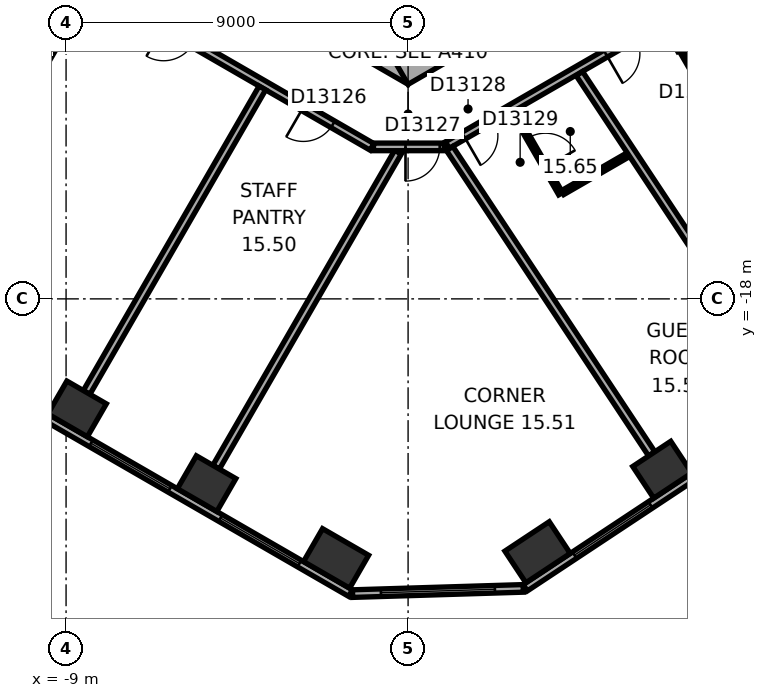
"""IFC4 building model, lengths in metres.
Left out: names, types, materials, properties, quantities, classifications, styles, units other than length and angle.
Written with IfcOpenShell. Run it as: python <this file> out.ifc"""

import sys

from ifc_helpers import new_model, si_unit, direction, frame, frame_2d, origin, origin_2d, place, context, subcontext, project, spatial, rectangle, extrude, element, fill, save


model = new_model("IFC4")
c1 = context("Model", 3, precision=1e-05, world=origin(), true_north=direction((0.0, 1.0)))
c2 = subcontext(c1, "Body", "Model", "MODEL_VIEW")
j1 = project(units=[si_unit("LENGTHUNIT", "METRE"), si_unit("PLANEANGLEUNIT", "RADIAN")], contexts=[c1])
p1 = place(None, origin())
s1 = spatial("IfcSite", under=j1, at=p1, CompositionType="ELEMENT")
p2 = place(p1, origin())
s2 = spatial("IfcBuilding", under=s1, at=p2, CompositionType="ELEMENT")
p3 = place(p2, frame((0.0, 0.0, 70.4)))
s3 = spatial("IfcBuildingStorey", under=s2, at=p3, CompositionType="ELEMENT", Elevation=70.4)
for number, where, z_axis, x_axis in (
    (1, (-8.71, -20.895, 0.0), (0.0, 0.0, 1.0), (0.866, -0.5, 0.0)),
    (2, (-5.302, -22.862, 0.0), (0.0, 0.0, 1.0), (0.866, -0.5, 0.0)),
):
    element("IfcColumn", number, at=place(p3, frame(where, z_axis=z_axis, x_axis=x_axis)), inside=s3, PredefinedType="COLUMN", context=c2, shape_type="SweptSolid", body=[
        extrude(rectangle(XDim=1.2, YDim=1.0, at=origin_2d()), origin(), (0.0, 0.0, 1.0), 3.3),
    ])
for number, where, z_axis, x_axis in (
    (3, (-1.895, -24.829, 0.0), (0.0, 0.0, 1.0), (0.866, -0.5, 0.0)),
    (4, (3.407, -24.667, 0.0), (0.0, 0.0, 1.0), (0.834, 0.552, 0.0)),
):
    element("IfcColumn", number, at=place(p3, frame(where, z_axis=z_axis, x_axis=x_axis)), inside=s3, PredefinedType="COLUMN", context=c2, shape_type="SweptSolid", body=[
        extrude(rectangle(XDim=1.4, YDim=1.0, at=origin_2d()), origin(), (0.0, 0.0, 1.0), 3.3),
    ])
p4 = place(p3, frame((6.688, -22.496, 0.0), z_axis=(0.0, 0.0, 1.0), x_axis=(0.833885822067, 0.551936985312, 0.0)))
e5 = element("IfcColumn", 5, at=p4, inside=s3, PredefinedType="COLUMN", context=c2, shape_type="SweptSolid", body=[
    extrude(rectangle(XDim=1.2, YDim=1.0, at=origin_2d()), origin(), (0.0, 0.0, 1.0), 3.3),
])
p5 = place(p3, frame((-10.4, -5.658, 0.0), z_axis=(0.0, 0.0, 1.0), x_axis=(0.866021384402, -0.500006961711, 0.0)))
e6 = element("IfcWall", 6, at=p5, inside=s3, PredefinedType="SHEAR", context=c2, shape_type="SweptSolid", body=[
    extrude(rectangle(XDim=12.355, YDim=1.2, at=frame_2d((6.178, 0.0))), origin(), (0.0, 0.0, 1.0), 3.3),
])
p6 = place(p5, frame((6.378, 0.0, 0.0)))
e7 = element("IfcOpeningElement", 7, at=p6, cuts=e6, PredefinedType="OPENING", context=c2, shape_type="SweptSolid", body=[
    extrude(rectangle(XDim=1.5, YDim=2.1, at=frame_2d((0.75, 1.05))), frame((0.0, 0.61, 0.0), z_axis=(0.0, -1.0, 0.0), x_axis=(1.0, 0.0, 0.0)), (0.0, 0.0, 1.0), 1.22),
])
p7 = place(p5, frame((3.228, 0.0, 0.0)))
e8 = element("IfcOpeningElement", 8, at=p7, cuts=e6, PredefinedType="OPENING", context=c2, shape_type="SweptSolid", body=[
    extrude(rectangle(XDim=0.9, YDim=2.1, at=frame_2d((0.45, 1.05))), frame((0.0, 0.61, 0.0), z_axis=(0.0, -1.0, 0.0), x_axis=(1.0, 0.0, 0.0)), (0.0, 0.0, 1.0), 1.22),
])
p8 = place(p3, frame((-0.3, -11.836, 0.0), z_axis=(0.0, 0.0, 1.0), x_axis=(0.866021384402, 0.500006961711, 0.0)))
e9 = element("IfcWall", 9, at=p8, inside=s3, PredefinedType="SHEAR", context=c2, shape_type="SweptSolid", body=[
    extrude(rectangle(XDim=12.355, YDim=1.2, at=frame_2d((6.178, 0.0))), origin(), (0.0, 0.0, 1.0), 3.3),
])
p9 = place(p8, frame((4.128, 0.0, 0.0)))
e10 = element("IfcOpeningElement", 10, at=p9, cuts=e9, PredefinedType="OPENING", context=c2, shape_type="SweptSolid", body=[
    extrude(rectangle(XDim=0.9, YDim=2.1, at=frame_2d((0.45, 1.05))), frame((0.0, 0.61, 0.0), z_axis=(0.0, -1.0, 0.0), x_axis=(1.0, 0.0, 0.0)), (0.0, 0.0, 1.0), 1.22),
])
p10 = place(p8, frame((7.928, 0.0, 0.0)))
e11 = element("IfcOpeningElement", 11, at=p10, cuts=e9, PredefinedType="OPENING", context=c2, shape_type="SweptSolid", body=[
    extrude(rectangle(XDim=1.1, YDim=2.1, at=frame_2d((0.55, 1.05))), frame((0.0, 0.61, 0.0), z_axis=(0.0, -1.0, 0.0), x_axis=(1.0, 0.0, 0.0)), (0.0, 0.0, 1.0), 1.22),
])
p11 = place(p3, frame((-19.914, -15.119, 0.0), z_axis=(0.0, 0.0, 1.0), x_axis=(0.866025418898, -0.499999973822, 0.0)))
e12 = element("IfcWall", 12, at=p11, inside=s3, PredefinedType="STANDARD", context=c2, shape_type="SweptSolid", body=[
    extrude(rectangle(XDim=21.246, YDim=0.2, at=frame_2d((10.623, 0.0))), origin(), (0.0, 0.0, 1.0), 3.3),
])
p12 = place(p11, frame((1.555, 0.0, 0.8)))
e13 = element("IfcOpeningElement", 13, at=p12, cuts=e12, PredefinedType="OPENING", context=c2, shape_type="SweptSolid", body=[
    extrude(rectangle(XDim=2.4, YDim=1.7, at=frame_2d((1.2, 0.85))), frame((0.0, 0.11, 0.0), z_axis=(0.0, -1.0, 0.0), x_axis=(1.0, 0.0, 0.0)), (0.0, 0.0, 1.0), 0.22),
])
p13 = place(p11, frame((5.489, 0.0, 0.8)))
e14 = element("IfcOpeningElement", 14, at=p13, cuts=e12, PredefinedType="OPENING", context=c2, shape_type="SweptSolid", body=[
    extrude(rectangle(XDim=2.4, YDim=1.7, at=frame_2d((1.2, 0.85))), frame((0.0, 0.11, 0.0), z_axis=(0.0, -1.0, 0.0), x_axis=(1.0, 0.0, 0.0)), (0.0, 0.0, 1.0), 0.22),
])
p14 = place(p11, frame((9.424, 0.0, 0.8)))
e15 = element("IfcOpeningElement", 15, at=p14, cuts=e12, PredefinedType="OPENING", context=c2, shape_type="SweptSolid", body=[
    extrude(rectangle(XDim=2.4, YDim=1.7, at=frame_2d((1.2, 0.85))), frame((0.0, 0.11, 0.0), z_axis=(0.0, -1.0, 0.0), x_axis=(1.0, 0.0, 0.0)), (0.0, 0.0, 1.0), 0.22),
])
p15 = place(p11, frame((13.358, 0.0, 0.8)))
e16 = element("IfcOpeningElement", 16, at=p15, cuts=e12, PredefinedType="OPENING", context=c2, shape_type="SweptSolid", body=[
    extrude(rectangle(XDim=2.4, YDim=1.7, at=frame_2d((1.2, 0.85))), frame((0.0, 0.11, 0.0), z_axis=(0.0, -1.0, 0.0), x_axis=(1.0, 0.0, 0.0)), (0.0, 0.0, 1.0), 0.22),
])
p16 = place(p11, frame((17.293, 0.0, 0.8)))
e17 = element("IfcOpeningElement", 17, at=p16, cuts=e12, PredefinedType="OPENING", context=c2, shape_type="SweptSolid", body=[
    extrude(rectangle(XDim=2.4, YDim=1.7, at=frame_2d((1.2, 0.85))), frame((0.0, 0.11, 0.0), z_axis=(0.0, -1.0, 0.0), x_axis=(1.0, 0.0, 0.0)), (0.0, 0.0, 1.0), 0.22),
])
p17 = place(p3, frame((-1.461, -25.755, 0.0), z_axis=(0.0, 0.0, 1.0), x_axis=(0.999533823446, 0.030530898895, 0.0)))
e18 = element("IfcWall", 18, at=p17, inside=s3, PredefinedType="STANDARD", context=c2, shape_type="SweptSolid", body=[
    extrude(rectangle(XDim=4.494, YDim=0.2, at=frame_2d((2.247, 0.0))), origin(), (0.0, 0.0, 1.0), 3.3),
])
p18 = place(p17, frame((0.747, 0.0, 0.8)))
e19 = element("IfcOpeningElement", 19, at=p18, cuts=e18, PredefinedType="OPENING", context=c2, shape_type="SweptSolid", body=[
    extrude(rectangle(XDim=3.0, YDim=1.7, at=frame_2d((1.5, 0.85))), frame((0.0, 0.11, 0.0), z_axis=(0.0, -1.0, 0.0), x_axis=(1.0, 0.0, 0.0)), (0.0, 0.0, 1.0), 0.22),
])
p19 = place(p3, frame((3.083, -25.601, 0.0), z_axis=(0.0, 0.0, 1.0), x_axis=(0.833884295743, 0.551939291329, 0.0)))
e20 = element("IfcWall", 20, at=p19, inside=s3, PredefinedType="STANDARD", context=c2, shape_type="SweptSolid", body=[
    extrude(rectangle(XDim=21.246, YDim=0.2, at=frame_2d((10.623, 0.0))), origin(), (0.0, 0.0, 1.0), 3.3),
])
p20 = place(p19, frame((1.553, 0.0, 0.8)))
e21 = element("IfcOpeningElement", 21, at=p20, cuts=e20, PredefinedType="OPENING", context=c2, shape_type="SweptSolid", body=[
    extrude(rectangle(XDim=2.4, YDim=1.7, at=frame_2d((1.2, 0.85))), frame((0.0, 0.11, 0.0), z_axis=(0.0, -1.0, 0.0), x_axis=(1.0, 0.0, 0.0)), (0.0, 0.0, 1.0), 0.22),
])
p21 = place(p19, frame((5.488, 0.0, 0.8)))
e22 = element("IfcOpeningElement", 22, at=p21, cuts=e20, PredefinedType="OPENING", context=c2, shape_type="SweptSolid", body=[
    extrude(rectangle(XDim=2.4, YDim=1.7, at=frame_2d((1.2, 0.85))), frame((0.0, 0.11, 0.0), z_axis=(0.0, -1.0, 0.0), x_axis=(1.0, 0.0, 0.0)), (0.0, 0.0, 1.0), 0.22),
])
p22 = place(p19, frame((9.422, 0.0, 0.8)))
e23 = element("IfcOpeningElement", 23, at=p22, cuts=e20, PredefinedType="OPENING", context=c2, shape_type="SweptSolid", body=[
    extrude(rectangle(XDim=2.4, YDim=1.7, at=frame_2d((1.2, 0.85))), frame((0.0, 0.11, 0.0), z_axis=(0.0, -1.0, 0.0), x_axis=(1.0, 0.0, 0.0)), (0.0, 0.0, 1.0), 0.22),
])
p23 = place(p19, frame((13.357, 0.0, 0.8)))
e24 = element("IfcOpeningElement", 24, at=p23, cuts=e20, PredefinedType="OPENING", context=c2, shape_type="SweptSolid", body=[
    extrude(rectangle(XDim=2.4, YDim=1.7, at=frame_2d((1.2, 0.85))), frame((0.0, 0.11, 0.0), z_axis=(0.0, -1.0, 0.0), x_axis=(1.0, 0.0, 0.0)), (0.0, 0.0, 1.0), 0.22),
])
p24 = place(p19, frame((17.291, 0.0, 0.8)))
e25 = element("IfcOpeningElement", 25, at=p24, cuts=e20, PredefinedType="OPENING", context=c2, shape_type="SweptSolid", body=[
    extrude(rectangle(XDim=2.4, YDim=1.7, at=frame_2d((1.2, 0.85))), frame((0.0, 0.11, 0.0), z_axis=(0.0, -1.0, 0.0), x_axis=(1.0, 0.0, 0.0)), (0.0, 0.0, 1.0), 0.22),
])
p25 = place(p3, frame((-11.615, -7.843, 0.0), z_axis=(0.0, 0.0, 1.0), x_axis=(0.866026466995, -0.499998158461, 0.0)))
e26 = element("IfcWall", 26, at=p25, inside=s3, PredefinedType="PARTITIONING", context=c2, shape_type="SweptSolid", body=[
    extrude(rectangle(XDim=12.315, YDim=0.2, at=frame_2d((6.158, 0.0))), origin(), (0.0, 0.0, 1.0), 3.05),
])
p26 = place(p25, frame((5.983, 0.0, 0.0)))
e27 = element("IfcOpeningElement", 27, at=p26, cuts=e26, PredefinedType="OPENING", context=c2, shape_type="SweptSolid", body=[
    extrude(rectangle(XDim=0.9, YDim=2.1, at=frame_2d((0.45, 1.05))), frame((0.0, 0.11, 0.0), z_axis=(0.0, -1.0, 0.0), x_axis=(1.0, 0.0, 0.0)), (0.0, 0.0, 1.0), 0.22),
])
p27 = place(p25, frame((10.229, 0.0, 0.0)))
e28 = element("IfcOpeningElement", 28, at=p27, cuts=e26, PredefinedType="OPENING", context=c2, shape_type="SweptSolid", body=[
    extrude(rectangle(XDim=0.9, YDim=2.1, at=frame_2d((0.45, 1.05))), frame((0.0, 0.11, 0.0), z_axis=(0.0, -1.0, 0.0), x_axis=(1.0, 0.0, 0.0)), (0.0, 0.0, 1.0), 0.22),
])
p28 = place(p3, frame((-8.46, -20.461, 0.0), z_axis=(0.0, 0.0, 1.0), x_axis=(0.499999662836, 0.866025598446, 0.0)))
e29 = element("IfcWall", 29, at=p28, inside=s3, PredefinedType="PARTITIONING", context=c2, shape_type="SweptSolid", body=[
    extrude(rectangle(XDim=9.25, YDim=0.2, at=frame_2d((4.625, 0.0))), origin(), (0.0, 0.0, 1.0), 3.05),
])
p29 = place(p3, frame((-8.398, -9.816, 0.0), z_axis=(0.0, 0.0, 1.0), x_axis=(-0.500007957085, -0.86602080971, 0.0)))
e30 = element("IfcWall", 30, at=p29, inside=s3, PredefinedType="PARTITIONING", context=c2, shape_type="SweptSolid", body=[
    extrude(rectangle(XDim=2.64, YDim=0.12, at=frame_2d((1.32, 0.0))), origin(), (0.0, 0.0, 1.0), 3.05),
])
p30 = place(p29, frame((0.87, 0.0, 0.0)))
e31 = element("IfcOpeningElement", 31, at=p30, cuts=e30, PredefinedType="OPENING", context=c2, shape_type="SweptSolid", body=[
    extrude(rectangle(XDim=0.9, YDim=2.1, at=frame_2d((0.45, 1.05))), frame((0.0, 0.07, 0.0), z_axis=(0.0, -1.0, 0.0), x_axis=(1.0, 0.0, 0.0)), (0.0, 0.0, 1.0), 0.14),
])
p31 = place(p3, frame((-5.052, -22.429, 0.0), z_axis=(0.0, 0.0, 1.0), x_axis=(0.500004329283, 0.866022904257, 0.0)))
e32 = element("IfcWall", 32, at=p31, inside=s3, PredefinedType="PARTITIONING", context=c2, shape_type="SweptSolid", body=[
    extrude(rectangle(XDim=9.572, YDim=0.2, at=frame_2d((4.786, 0.0))), origin(), (0.0, 0.0, 1.0), 3.05),
])
p32 = place(p3, frame((-0.91, -14.001, 0.0), z_axis=(0.0, 0.0, 1.0), x_axis=(1.0, 0.0, 0.0)))
e33 = element("IfcWall", 33, at=p32, inside=s3, PredefinedType="PARTITIONING", context=c2, shape_type="SweptSolid", body=[
    extrude(rectangle(XDim=1.86, YDim=0.2, at=frame_2d((0.93, 0.0))), origin(), (0.0, 0.0, 1.0), 3.05),
])
p33 = place(p32, frame((0.842, 0.0, 0.0)))
e34 = element("IfcOpeningElement", 34, at=p33, cuts=e33, PredefinedType="OPENING", context=c2, shape_type="SweptSolid", body=[
    extrude(rectangle(XDim=0.9, YDim=2.1, at=frame_2d((0.45, 1.05))), frame((0.0, 0.11, 0.0), z_axis=(0.0, -1.0, 0.0), x_axis=(1.0, 0.0, 0.0)), (0.0, 0.0, 1.0), 0.22),
])
p34 = place(p3, frame((1.033, -13.953, 0.0), z_axis=(0.0, 0.0, 1.0), x_axis=(0.866017531406, 0.500013635111, 0.0)))
e35 = element("IfcWall", 35, at=p34, inside=s3, PredefinedType="PARTITIONING", context=c2, shape_type="SweptSolid", body=[
    extrude(rectangle(XDim=6.58, YDim=0.2, at=frame_2d((3.29, 0.0))), origin(), (0.0, 0.0, 1.0), 3.05),
])
p35 = place(p34, frame((0.496, 0.0, 0.0)))
e36 = element("IfcOpeningElement", 36, at=p35, cuts=e35, PredefinedType="OPENING", context=c2, shape_type="SweptSolid", body=[
    extrude(rectangle(XDim=0.9, YDim=2.1, at=frame_2d((0.45, 1.05))), frame((0.0, 0.11, 0.0), z_axis=(0.0, -1.0, 0.0), x_axis=(1.0, 0.0, 0.0)), (0.0, 0.0, 1.0), 0.22),
])
p36 = place(p34, frame((4.811, 0.0, 0.0)))
e37 = element("IfcOpeningElement", 37, at=p36, cuts=e35, PredefinedType="OPENING", context=c2, shape_type="SweptSolid", body=[
    extrude(rectangle(XDim=0.9, YDim=2.1, at=frame_2d((0.45, 1.05))), frame((0.0, 0.11, 0.0), z_axis=(0.0, -1.0, 0.0), x_axis=(1.0, 0.0, 0.0)), (0.0, 0.0, 1.0), 0.22),
])
p37 = place(p3, frame((4.015, -15.233, 0.0), z_axis=(0.0, 0.0, 1.0), x_axis=(-0.499961950354, 0.866047370643, 0.0)))
e38 = element("IfcWall", 38, at=p37, inside=s3, PredefinedType="PARTITIONING", context=c2, shape_type="SweptSolid", body=[
    extrude(rectangle(XDim=2.5, YDim=0.12, at=frame_2d((1.25, 0.0))), origin(), (0.0, 0.0, 1.0), 3.05),
])
p38 = place(p37, frame((0.8, 0.0, 0.0)))
e39 = element("IfcOpeningElement", 39, at=p38, cuts=e38, PredefinedType="OPENING", context=c2, shape_type="SweptSolid", body=[
    extrude(rectangle(XDim=0.9, YDim=2.1, at=frame_2d((0.45, 1.05))), frame((0.0, 0.07, 0.0), z_axis=(0.0, -1.0, 0.0), x_axis=(1.0, 0.0, 0.0)), (0.0, 0.0, 1.0), 0.14),
])
p39 = place(p3, frame((5.798, -14.204, 0.0), z_axis=(0.0, 0.0, 1.0), x_axis=(-0.865972029493, -0.500092435591, 0.0)))
e40 = element("IfcWall", 40, at=p39, inside=s3, PredefinedType="PARTITIONING", context=c2, shape_type="SweptSolid", body=[
    extrude(rectangle(XDim=1.999, YDim=0.12, at=frame_2d((1.0, 0.0))), origin(), (0.0, 0.0, 1.0), 3.05),
])
p40 = place(p3, frame((6.412, -22.079, 0.0), z_axis=(0.0, 0.0, 1.0), x_axis=(-0.551919507115, 0.83389739037, 0.0)))
e41 = element("IfcWall", 41, at=p40, inside=s3, PredefinedType="PARTITIONING", context=c2, shape_type="SweptSolid", body=[
    extrude(rectangle(XDim=9.635, YDim=0.2, at=frame_2d((4.817, 0.0))), origin(), (0.0, 0.0, 1.0), 3.05),
])
p41 = place(p3, frame((8.833, -14.301, 0.0), z_axis=(0.0, 0.0, 1.0), x_axis=(-0.499936836718, 0.866061868051, 0.0)))
e42 = element("IfcWall", 42, at=p41, inside=s3, PredefinedType="PARTITIONING", context=c2, shape_type="SweptSolid", body=[
    extrude(rectangle(XDim=3.188, YDim=0.12, at=frame_2d((1.594, 0.0))), origin(), (0.0, 0.0, 1.0), 3.05),
])
p42 = place(p41, frame((1.144, 0.0, 0.0)))
e43 = element("IfcOpeningElement", 43, at=p42, cuts=e42, PredefinedType="OPENING", context=c2, shape_type="SweptSolid", body=[
    extrude(rectangle(XDim=0.9, YDim=2.1, at=frame_2d((0.45, 1.05))), frame((0.0, 0.07, 0.0), z_axis=(0.0, -1.0, 0.0), x_axis=(1.0, 0.0, 0.0)), (0.0, 0.0, 1.0), 0.14),
])
p43 = place(p3, frame((9.693, -19.907, 0.0), z_axis=(0.0, 0.0, 1.0), x_axis=(-0.551938394837, 0.833884889121, 0.0)))
e44 = element("IfcWall", 44, at=p43, inside=s3, PredefinedType="PARTITIONING", context=c2, shape_type="SweptSolid", body=[
    extrude(rectangle(XDim=9.394, YDim=0.2, at=frame_2d((4.697, 0.0))), origin(), (0.0, 0.0, 1.0), 2.6),
])
p44 = place(p15, origin())
e45 = element("IfcWindow", 45, at=p44, inside=s3, PartitioningType="SINGLE_PANEL", PredefinedType="WINDOW", context=c2, shape_type="SweptSolid", body=[
    extrude(rectangle(XDim=2.4, YDim=1.7, at=frame_2d((1.2, 0.85))), frame((0.0, 0.03, 0.0), z_axis=(0.0, -1.0, 0.0), x_axis=(1.0, 0.0, 0.0)), (0.0, 0.0, 1.0), 0.06),
])
fill(e16, e45)
p45 = place(p16, origin())
e46 = element("IfcWindow", 46, at=p45, inside=s3, PartitioningType="SINGLE_PANEL", PredefinedType="WINDOW", context=c2, shape_type="SweptSolid", body=[
    extrude(rectangle(XDim=2.4, YDim=1.7, at=frame_2d((1.2, 0.85))), frame((0.0, 0.03, 0.0), z_axis=(0.0, -1.0, 0.0), x_axis=(1.0, 0.0, 0.0)), (0.0, 0.0, 1.0), 0.06),
])
fill(e17, e46)
p46 = place(p18, origin())
e47 = element("IfcWindow", 47, at=p46, inside=s3, PartitioningType="SINGLE_PANEL", PredefinedType="WINDOW", context=c2, shape_type="SweptSolid", body=[
    extrude(rectangle(XDim=3.0, YDim=1.7, at=frame_2d((1.5, 0.85))), frame((0.0, 0.03, 0.0), z_axis=(0.0, -1.0, 0.0), x_axis=(1.0, 0.0, 0.0)), (0.0, 0.0, 1.0), 0.06),
])
fill(e19, e47)
p47 = place(p20, origin())
e48 = element("IfcWindow", 48, at=p47, inside=s3, PartitioningType="SINGLE_PANEL", PredefinedType="WINDOW", context=c2, shape_type="SweptSolid", body=[
    extrude(rectangle(XDim=2.4, YDim=1.7, at=frame_2d((1.2, 0.85))), frame((0.0, 0.03, 0.0), z_axis=(0.0, -1.0, 0.0), x_axis=(1.0, 0.0, 0.0)), (0.0, 0.0, 1.0), 0.06),
])
fill(e21, e48)
p48 = place(p27, origin())
e49 = element("IfcDoor", 49, at=p48, inside=s3, OperationType="SINGLE_SWING_LEFT", PredefinedType="DOOR", context=c2, shape_type="SweptSolid", body=[
    extrude(rectangle(XDim=0.9, YDim=2.1, at=frame_2d((0.45, 1.05))), frame((0.0, 0.025, 0.0), z_axis=(0.0, -1.0, 0.0), x_axis=(1.0, 0.0, 0.0)), (0.0, 0.0, 1.0), 0.05),
])
fill(e28, e49)
p49 = place(p33, origin())
e50 = element("IfcDoor", 50, at=p49, inside=s3, OperationType="SINGLE_SWING_LEFT", PredefinedType="DOOR", context=c2, shape_type="SweptSolid", body=[
    extrude(rectangle(XDim=0.9, YDim=2.1, at=frame_2d((0.45, 1.05))), frame((0.0, 0.025, 0.0), z_axis=(0.0, -1.0, 0.0), x_axis=(1.0, 0.0, 0.0)), (0.0, 0.0, 1.0), 0.05),
])
fill(e34, e50)
p50 = place(p35, origin())
e51 = element("IfcDoor", 51, at=p50, inside=s3, OperationType="SINGLE_SWING_LEFT", PredefinedType="DOOR", context=c2, shape_type="SweptSolid", body=[
    extrude(rectangle(XDim=0.9, YDim=2.1, at=frame_2d((0.45, 1.05))), frame((0.0, 0.025, 0.0), z_axis=(0.0, -1.0, 0.0), x_axis=(1.0, 0.0, 0.0)), (0.0, 0.0, 1.0), 0.05),
])
fill(e36, e51)
p51 = place(p38, origin())
e52 = element("IfcDoor", 52, at=p51, inside=s3, OperationType="SINGLE_SWING_LEFT", PredefinedType="DOOR", context=c2, shape_type="SweptSolid", body=[
    extrude(rectangle(XDim=0.9, YDim=2.1, at=frame_2d((0.45, 1.05))), frame((0.0, 0.025, 0.0), z_axis=(0.0, -1.0, 0.0), x_axis=(1.0, 0.0, 0.0)), (0.0, 0.0, 1.0), 0.05),
])
fill(e39, e52)
p52 = place(p36, origin())
e53 = element("IfcDoor", 53, at=p52, inside=s3, OperationType="SINGLE_SWING_LEFT", PredefinedType="DOOR", context=c2, shape_type="SweptSolid", body=[
    extrude(rectangle(XDim=0.9, YDim=2.1, at=frame_2d((0.45, 1.05))), frame((0.0, 0.025, 0.0), z_axis=(0.0, -1.0, 0.0), x_axis=(1.0, 0.0, 0.0)), (0.0, 0.0, 1.0), 0.05),
])
fill(e37, e53)
save(model, sys.argv[1])
